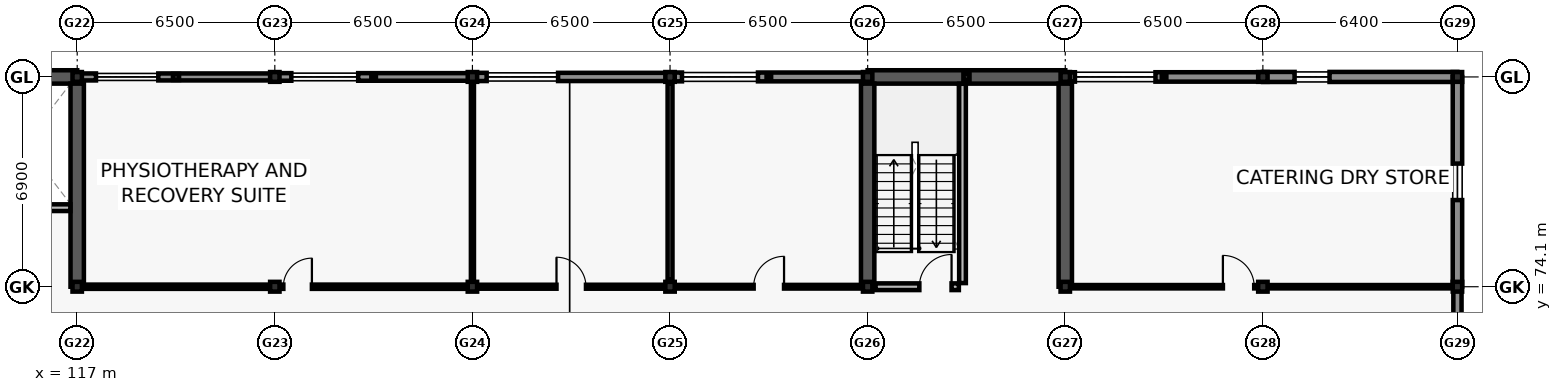
"""IFC4 building model, lengths in metres.
Left out: names, types, materials, properties, quantities, classifications, styles, units other than length and angle.
Written with IfcOpenShell. Run it as: python <this file> out.ifc"""

import sys

from ifc_helpers import new_model, si_unit, direction, frame, frame_2d, origin, origin_2d, place, context, subcontext, project, spatial, rectangle, hollow_rectangle, i_section, extrude, element, fill, save


model = new_model("IFC4")
c1 = context("Model", 3, precision=1e-05, world=origin(), true_north=direction((0.0, 1.0)))
c2 = subcontext(c1, "Body", "Model", "MODEL_VIEW")
j1 = project(units=[si_unit("LENGTHUNIT", "METRE"), si_unit("PLANEANGLEUNIT", "RADIAN")], contexts=[c1])
p1 = place(None, origin())
s1 = spatial("IfcSite", under=j1, at=p1, CompositionType="ELEMENT")
p2 = place(p1, origin())
s2 = spatial("IfcBuilding", under=s1, at=p2, CompositionType="ELEMENT")
p3 = place(p2, frame((0.0, 0.0, 5.4)))
s3 = spatial("IfcBuildingStorey", under=s2, at=p3, CompositionType="ELEMENT", Elevation=5.4)
for number, where, z_axis, x_axis in (
    (1, (117.0, 74.1, 0.0), (0.0, 0.0, 1.0), (1.0, 0.0, 0.0)),
    (2, (117.0, 81.0, 0.0), (0.0, 0.0, 1.0), (1.0, 0.0, 0.0)),
    (3, (123.5, 74.1, 0.0), (0.0, 0.0, 1.0), (1.0, 0.0, 0.0)),
    (4, (123.5, 81.0, 0.0), (0.0, 0.0, 1.0), (1.0, 0.0, 0.0)),
    (5, (130.0, 74.1, 0.0), (0.0, 0.0, 1.0), (1.0, 0.0, 0.0)),
    (6, (130.0, 81.0, 0.0), (0.0, 0.0, 1.0), (1.0, 0.0, 0.0)),
    (7, (136.5, 74.1, 0.0), (0.0, 0.0, 1.0), (1.0, 0.0, 0.0)),
    (8, (136.5, 81.0, 0.0), (0.0, 0.0, 1.0), (1.0, 0.0, 0.0)),
    (9, (143.0, 74.1, 0.0), (0.0, 0.0, 1.0), (1.0, 0.0, 0.0)),
    (10, (143.0, 81.0, 0.0), (0.0, 0.0, 1.0), (1.0, 0.0, 0.0)),
    (11, (149.5, 74.1, 0.0), (0.0, 0.0, 1.0), (1.0, 0.0, 0.0)),
    (12, (149.5, 81.0, 0.0), (0.0, 0.0, 1.0), (1.0, 0.0, 0.0)),
    (13, (156.0, 74.1, 0.0), (0.0, 0.0, 1.0), (1.0, 0.0, 0.0)),
    (14, (156.0, 81.0, 0.0), (0.0, 0.0, 1.0), (1.0, 0.0, 0.0)),
    (15, (162.4, 74.1, 0.0), (0.0, 0.0, 1.0), (1.0, 0.0, 0.0)),
    (16, (162.4, 81.0, 0.0), (0.0, 0.0, 1.0), (1.0, 0.0, 0.0)),
):
    element("IfcColumn", number, at=place(p3, frame(where, z_axis=z_axis, x_axis=x_axis)), inside=s3, PredefinedType="COLUMN", context=c2, shape_type="SweptSolid", body=[
        extrude(i_section(OverallWidth=0.309, OverallDepth=0.321, WebThickness=0.014, FlangeThickness=0.022, FilletRadius=0.017, at=origin_2d()), origin(), (0.0, 0.0, 1.0), 4.2),
    ])
p4 = place(p3, frame((120.25, 81.0, 0.0), z_axis=(0.0, 0.0, 1.0), x_axis=(1.0, 0.0, 0.0)))
e17 = element("IfcColumn", 17, at=p4, inside=s3, PredefinedType="PILASTER", context=c2, shape_type="SweptSolid", body=[
    extrude(hollow_rectangle(XDim=0.2, YDim=0.2, WallThickness=0.01, at=origin_2d()), origin(), (0.0, 0.0, 1.0), 4.2),
])
for number, where, z_axis, x_axis in (
    (18, (126.75, 81.0, 0.0), (0.0, 0.0, 1.0), (1.0, 0.0, 0.0)),
    (19, (139.75, 81.0, 0.0), (0.0, 0.0, 1.0), (1.0, 0.0, 0.0)),
):
    element("IfcColumn", number, at=place(p3, frame(where, z_axis=z_axis, x_axis=x_axis)), inside=s3, PredefinedType="PILASTER", context=c2, shape_type="SweptSolid", body=[
        extrude(hollow_rectangle(XDim=0.15, YDim=0.15, WallThickness=0.009, at=origin_2d()), origin(), (0.0, 0.0, 1.0), 4.2),
    ])
p5 = place(p3, frame((146.25, 81.0, 0.0), z_axis=(0.0, 0.0, 1.0), x_axis=(1.0, 0.0, 0.0)))
e20 = element("IfcColumn", 20, at=p5, inside=s3, PredefinedType="PILASTER", context=c2, shape_type="SweptSolid", body=[
    extrude(hollow_rectangle(XDim=0.2, YDim=0.2, WallThickness=0.01, at=origin_2d()), origin(), (0.0, 0.0, 1.0), 4.2),
])
p6 = place(p3, frame((152.75, 81.0, 0.0), z_axis=(0.0, 0.0, 1.0), x_axis=(1.0, 0.0, 0.0)))
e21 = element("IfcColumn", 21, at=p6, inside=s3, PredefinedType="PILASTER", context=c2, shape_type="SweptSolid", body=[
    extrude(hollow_rectangle(XDim=0.15, YDim=0.15, WallThickness=0.009, at=origin_2d()), origin(), (0.0, 0.0, 1.0), 4.2),
])
p7 = place(p3, frame((110.5, 81.0, 0.0), z_axis=(0.0, 0.0, 1.0), x_axis=(1.0, 0.0, 0.0)))
e22 = element("IfcWall", 22, at=p7, inside=s3, PredefinedType="SHEAR", context=c2, shape_type="SweptSolid", body=[
    extrude(rectangle(XDim=6.5, YDim=0.44, at=frame_2d((3.25, 0.0))), origin(), (0.0, 0.0, 1.0), 3.96),
])
p8 = place(p3, frame((117.0, 74.1, 0.0), z_axis=(0.0, 0.0, 1.0), x_axis=(0.0, 1.0, 0.0)))
e23 = element("IfcWall", 23, at=p8, inside=s3, PredefinedType="SHEAR", context=c2, shape_type="SweptSolid", body=[
    extrude(rectangle(XDim=6.68, YDim=0.44, at=frame_2d((3.34, 0.0))), origin(), (0.0, 0.0, 1.0), 3.96),
])
p9 = place(p3, frame((143.0, 81.0, 0.0), z_axis=(0.0, 0.0, 1.0), x_axis=(1.0, 0.0, 0.0)))
e24 = element("IfcWall", 24, at=p9, inside=s3, PredefinedType="SHEAR", context=c2, shape_type="SweptSolid", body=[
    extrude(rectangle(XDim=6.5, YDim=0.44, at=frame_2d((3.25, 0.0))), origin(), (0.0, 0.0, 1.0), 3.96),
])
for number, where, z_axis, x_axis in (
    (25, (143.0, 74.1, 0.0), (0.0, 0.0, 1.0), (0.0, 1.0, 0.0)),
    (26, (149.5, 74.1, 0.0), (0.0, 0.0, 1.0), (0.0, 1.0, 0.0)),
):
    element("IfcWall", number, at=place(p3, frame(where, z_axis=z_axis, x_axis=x_axis)), inside=s3, PredefinedType="SHEAR", context=c2, shape_type="SweptSolid", body=[
        extrude(rectangle(XDim=6.68, YDim=0.44, at=frame_2d((3.34, 0.0))), origin(), (0.0, 0.0, 1.0), 3.96),
    ])
p10 = place(p3, frame((117.005, 81.0, 0.0), z_axis=(0.0, 0.0, 1.0), x_axis=(1.0, 0.0, 0.0)))
e27 = element("IfcWall", 27, at=p10, inside=s3, PredefinedType="SOLIDWALL", context=c2, shape_type="SweptSolid", body=[
    extrude(rectangle(XDim=6.49, YDim=0.23, at=frame_2d((3.245, 0.0))), origin(), (0.0, 0.0, 1.0), 3.32),
])
p11 = place(p10, frame((0.613, 0.0, 0.8)))
e28 = element("IfcOpeningElement", 28, at=p11, cuts=e27, PredefinedType="OPENING", context=c2, shape_type="SweptSolid", body=[
    extrude(rectangle(XDim=2.05, YDim=1.8, at=frame_2d((1.025, 0.9))), frame((0.0, 0.125, 0.0), z_axis=(0.0, -1.0, 0.0), x_axis=(1.0, 0.0, 0.0)), (0.0, 0.0, 1.0), 0.25),
])
p12 = place(p3, frame((123.505, 81.0, 0.0), z_axis=(0.0, 0.0, 1.0), x_axis=(1.0, 0.0, 0.0)))
e29 = element("IfcWall", 29, at=p12, inside=s3, PredefinedType="SOLIDWALL", context=c2, shape_type="SweptSolid", body=[
    extrude(rectangle(XDim=6.49, YDim=0.25, at=frame_2d((3.245, 0.0))), origin(), (0.0, 0.0, 1.0), 3.32),
])
p13 = place(p12, frame((0.538, 0.0, 0.8)))
e30 = element("IfcOpeningElement", 30, at=p13, cuts=e29, PredefinedType="OPENING", context=c2, shape_type="SweptSolid", body=[
    extrude(rectangle(XDim=2.2, YDim=1.8, at=frame_2d((1.1, 0.9))), frame((0.0, 0.135, 0.0), z_axis=(0.0, -1.0, 0.0), x_axis=(1.0, 0.0, 0.0)), (0.0, 0.0, 1.0), 0.27),
])
p14 = place(p3, frame((130.005, 81.0, 0.0), z_axis=(0.0, 0.0, 1.0), x_axis=(1.0, 0.0, 0.0)))
e31 = element("IfcWall", 31, at=p14, inside=s3, PredefinedType="SOLIDWALL", context=c2, shape_type="SweptSolid", body=[
    extrude(rectangle(XDim=6.49, YDim=0.27, at=frame_2d((3.245, 0.0))), origin(), (0.0, 0.0, 1.0), 3.32),
])
p15 = place(p14, frame((0.462, 0.0, 0.8)))
e32 = element("IfcOpeningElement", 32, at=p15, cuts=e31, PredefinedType="OPENING", context=c2, shape_type="SweptSolid", body=[
    extrude(rectangle(XDim=2.35, YDim=1.8, at=frame_2d((1.175, 0.9))), frame((0.0, 0.145, 0.0), z_axis=(0.0, -1.0, 0.0), x_axis=(1.0, 0.0, 0.0)), (0.0, 0.0, 1.0), 0.29),
])
p16 = place(p3, frame((136.505, 81.0, 0.0), z_axis=(0.0, 0.0, 1.0), x_axis=(1.0, 0.0, 0.0)))
e33 = element("IfcWall", 33, at=p16, inside=s3, PredefinedType="SOLIDWALL", context=c2, shape_type="SweptSolid", body=[
    extrude(rectangle(XDim=6.49, YDim=0.29, at=frame_2d((3.245, 0.0))), origin(), (0.0, 0.0, 1.0), 3.32),
])
p17 = place(p16, frame((0.387, 0.0, 0.8)))
e34 = element("IfcOpeningElement", 34, at=p17, cuts=e33, PredefinedType="OPENING", context=c2, shape_type="SweptSolid", body=[
    extrude(rectangle(XDim=2.5, YDim=1.8, at=frame_2d((1.25, 0.9))), frame((0.0, 0.155, 0.0), z_axis=(0.0, -1.0, 0.0), x_axis=(1.0, 0.0, 0.0)), (0.0, 0.0, 1.0), 0.31),
])
p18 = place(p3, frame((149.505, 81.0, 0.0), z_axis=(0.0, 0.0, 1.0), x_axis=(1.0, 0.0, 0.0)))
e35 = element("IfcWall", 35, at=p18, inside=s3, PredefinedType="SOLIDWALL", context=c2, shape_type="SweptSolid", body=[
    extrude(rectangle(XDim=6.49, YDim=0.31, at=frame_2d((3.245, 0.0))), origin(), (0.0, 0.0, 1.0), 3.32),
])
p19 = place(p18, frame((0.312, 0.0, 0.8)))
e36 = element("IfcOpeningElement", 36, at=p19, cuts=e35, PredefinedType="OPENING", context=c2, shape_type="SweptSolid", body=[
    extrude(rectangle(XDim=2.65, YDim=1.8, at=frame_2d((1.325, 0.9))), frame((0.0, 0.165, 0.0), z_axis=(0.0, -1.0, 0.0), x_axis=(1.0, 0.0, 0.0)), (0.0, 0.0, 1.0), 0.33),
])
p20 = place(p3, frame((156.005, 81.0, 0.0), z_axis=(0.0, 0.0, 1.0), x_axis=(1.0, 0.0, 0.0)))
e37 = element("IfcWall", 37, at=p20, inside=s3, PredefinedType="SOLIDWALL", context=c2, shape_type="SweptSolid", body=[
    extrude(rectangle(XDim=6.39, YDim=0.33, at=frame_2d((3.195, 0.0))), origin(), (0.0, 0.0, 1.0), 3.32),
])
p21 = place(p20, frame((1.038, 0.0, 0.8)))
e38 = element("IfcOpeningElement", 38, at=p21, cuts=e37, PredefinedType="OPENING", context=c2, shape_type="SweptSolid", body=[
    extrude(rectangle(XDim=1.15, YDim=1.8, at=frame_2d((0.575, 0.9))), frame((0.0, 0.175, 0.0), z_axis=(0.0, -1.0, 0.0), x_axis=(1.0, 0.0, 0.0)), (0.0, 0.0, 1.0), 0.35),
])
p22 = place(p3, frame((162.4, 74.095, 0.0), z_axis=(0.0, 0.0, 1.0), x_axis=(0.0, -1.0, 0.0)))
e39 = element("IfcWall", 39, at=p22, inside=s3, PredefinedType="SOLIDWALL", context=c2, shape_type="SweptSolid", body=[
    extrude(rectangle(XDim=6.89, YDim=0.27, at=frame_2d((3.445, 0.0))), origin(), (0.0, 0.0, 1.0), 3.32),
])
p23 = place(p22, frame((4.002, 0.0, 0.8)))
e40 = element("IfcOpeningElement", 40, at=p23, cuts=e39, PredefinedType="OPENING", context=c2, shape_type="SweptSolid", body=[
    extrude(rectangle(XDim=1.45, YDim=1.8, at=frame_2d((0.725, 0.9))), frame((0.0, 0.145, 0.0), z_axis=(0.0, -1.0, 0.0), x_axis=(1.0, 0.0, 0.0)), (0.0, 0.0, 1.0), 0.29),
])
p24 = place(p3, frame((162.4, 80.995, 0.0), z_axis=(0.0, 0.0, 1.0), x_axis=(0.0, -1.0, 0.0)))
e41 = element("IfcWall", 41, at=p24, inside=s3, PredefinedType="SOLIDWALL", context=c2, shape_type="SweptSolid", body=[
    extrude(rectangle(XDim=6.89, YDim=0.31, at=frame_2d((3.445, 0.0))), origin(), (0.0, 0.0, 1.0), 3.32),
])
p25 = place(p24, frame((2.845, 0.0, 0.8)))
e42 = element("IfcOpeningElement", 42, at=p25, cuts=e41, PredefinedType="OPENING", context=c2, shape_type="SweptSolid", body=[
    extrude(rectangle(XDim=1.2, YDim=2.05, at=frame_2d((0.6, 1.025))), frame((0.0, 0.165, 0.0), z_axis=(0.0, -1.0, 0.0), x_axis=(1.0, 0.0, 0.0)), (0.0, 0.0, 1.0), 0.33),
])
p26 = place(p3, frame((113.74, 76.7, 0.0), z_axis=(0.0, 0.0, 1.0), x_axis=(1.0, 0.0, 0.0)))
e43 = element("IfcWall", 43, at=p26, inside=s3, PredefinedType="SOLIDWALL", context=c2, shape_type="SweptSolid", body=[
    extrude(rectangle(XDim=3.035, YDim=0.22, at=frame_2d((1.518, 0.0))), origin(), (0.0, 0.0, 1.0), 3.96),
])
p27 = place(p26, frame((0.917, 0.0, 0.0)))
e44 = element("IfcOpeningElement", 44, at=p27, cuts=e43, PredefinedType="OPENING", context=c2, shape_type="SweptSolid", body=[
    extrude(rectangle(XDim=1.2, YDim=2.15, at=frame_2d((0.6, 1.075))), frame((0.0, 0.12, 0.0), z_axis=(0.0, -1.0, 0.0), x_axis=(1.0, 0.0, 0.0)), (0.0, 0.0, 1.0), 0.24),
])
p28 = place(p3, frame((146.12, 74.22, 0.0), z_axis=(0.0, 0.0, 1.0), x_axis=(0.0, 1.0, 0.0)))
e45 = element("IfcWall", 45, at=p28, inside=s3, PredefinedType="SOLIDWALL", context=c2, shape_type="SweptSolid", body=[
    extrude(rectangle(XDim=6.555, YDim=0.22, at=frame_2d((3.277, 0.0))), origin(), (0.0, 0.0, 1.0), 3.96),
])
p29 = place(p3, frame((143.26, 74.1, 0.0), z_axis=(0.0, 0.0, 1.0), x_axis=(1.0, 0.0, 0.0)))
e46 = element("IfcWall", 46, at=p29, inside=s3, PredefinedType="SOLIDWALL", context=c2, shape_type="SweptSolid", body=[
    extrude(rectangle(XDim=2.74, YDim=0.22, at=frame_2d((1.37, 0.0))), origin(), (0.0, 0.0, 1.0), 3.32),
])
p30 = place(p29, frame((1.44, 0.0, 0.0)))
e47 = element("IfcOpeningElement", 47, at=p30, cuts=e46, PredefinedType="OPENING", context=c2, shape_type="SweptSolid", body=[
    extrude(rectangle(XDim=1.06, YDim=2.1, at=frame_2d((0.53, 1.05))), frame((0.0, 0.12, 0.0), z_axis=(0.0, -1.0, 0.0), x_axis=(1.0, 0.0, 0.0)), (0.0, 0.0, 1.0), 0.24),
])
p31 = place(p3, frame((117.22, 74.1, 0.0), z_axis=(0.0, 0.0, 1.0), x_axis=(1.0, 0.0, 0.0)))
e48 = element("IfcWall", 48, at=p31, inside=s3, PredefinedType="PARTITIONING", context=c2, shape_type="SweptSolid", body=[
    extrude(rectangle(XDim=12.56, YDim=0.14, at=frame_2d((6.28, 0.0))), origin(), (0.0, 0.0, 1.0), 3.3),
])
p32 = place(p31, frame((6.56, 0.0, 0.0)))
e49 = element("IfcOpeningElement", 49, at=p32, cuts=e48, PredefinedType="OPENING", context=c2, shape_type="SweptSolid", body=[
    extrude(rectangle(XDim=0.94, YDim=2.08, at=frame_2d((0.47, 1.04))), frame((0.0, 0.08, 0.0), z_axis=(0.0, -1.0, 0.0), x_axis=(1.0, 0.0, 0.0)), (0.0, 0.0, 1.0), 0.16),
])
p33 = place(p3, frame((130.22, 74.1, 0.0), z_axis=(0.0, 0.0, 1.0), x_axis=(1.0, 0.0, 0.0)))
e50 = element("IfcWall", 50, at=p33, inside=s3, PredefinedType="PARTITIONING", context=c2, shape_type="SweptSolid", body=[
    extrude(rectangle(XDim=6.06, YDim=0.13, at=frame_2d((3.03, 0.0))), origin(), (0.0, 0.0, 1.0), 3.3),
])
p34 = place(p33, frame((2.545, 0.0, 0.0)))
e51 = element("IfcOpeningElement", 51, at=p34, cuts=e50, PredefinedType="OPENING", context=c2, shape_type="SweptSolid", body=[
    extrude(rectangle(XDim=0.97, YDim=2.1, at=frame_2d((0.485, 1.05))), frame((0.0, 0.075, 0.0), z_axis=(0.0, -1.0, 0.0), x_axis=(1.0, 0.0, 0.0)), (0.0, 0.0, 1.0), 0.15),
])
p35 = place(p3, frame((136.72, 74.1, 0.0), z_axis=(0.0, 0.0, 1.0), x_axis=(1.0, 0.0, 0.0)))
e52 = element("IfcWall", 52, at=p35, inside=s3, PredefinedType="PARTITIONING", context=c2, shape_type="SweptSolid", body=[
    extrude(rectangle(XDim=6.06, YDim=0.12, at=frame_2d((3.03, 0.0))), origin(), (0.0, 0.0, 1.0), 3.3),
])
p36 = place(p35, frame((2.53, 0.0, 0.0)))
e53 = element("IfcOpeningElement", 53, at=p36, cuts=e52, PredefinedType="OPENING", context=c2, shape_type="SweptSolid", body=[
    extrude(rectangle(XDim=1.0, YDim=2.12, at=frame_2d((0.5, 1.06))), frame((0.0, 0.07, 0.0), z_axis=(0.0, -1.0, 0.0), x_axis=(1.0, 0.0, 0.0)), (0.0, 0.0, 1.0), 0.14),
])
p37 = place(p3, frame((149.72, 74.1, 0.0), z_axis=(0.0, 0.0, 1.0), x_axis=(1.0, 0.0, 0.0)))
e54 = element("IfcWall", 54, at=p37, inside=s3, PredefinedType="PARTITIONING", context=c2, shape_type="SweptSolid", body=[
    extrude(rectangle(XDim=12.46, YDim=0.11, at=frame_2d((6.23, 0.0))), origin(), (0.0, 0.0, 1.0), 3.3),
])
p38 = place(p37, frame((4.965, 0.0, 0.0)))
e55 = element("IfcOpeningElement", 55, at=p38, cuts=e54, PredefinedType="OPENING", context=c2, shape_type="SweptSolid", body=[
    extrude(rectangle(XDim=1.03, YDim=2.06, at=frame_2d((0.515, 1.03))), frame((0.0, 0.065, 0.0), z_axis=(0.0, -1.0, 0.0), x_axis=(1.0, 0.0, 0.0)), (0.0, 0.0, 1.0), 0.13),
])
p39 = place(p3, frame((130.0, 74.32, 0.0), z_axis=(0.0, 0.0, 1.0), x_axis=(0.0, 1.0, 0.0)))
e56 = element("IfcWall", 56, at=p39, inside=s3, PredefinedType="PARTITIONING", context=c2, shape_type="SweptSolid", body=[
    extrude(rectangle(XDim=6.46, YDim=0.1, at=frame_2d((3.23, 0.0))), origin(), (0.0, 0.0, 1.0), 3.3),
])
p40 = place(p3, frame((136.5, 74.32, 0.0), z_axis=(0.0, 0.0, 1.0), x_axis=(0.0, 1.0, 0.0)))
e57 = element("IfcWall", 57, at=p40, inside=s3, PredefinedType="PARTITIONING", context=c2, shape_type="SweptSolid", body=[
    extrude(rectangle(XDim=6.46, YDim=0.16, at=frame_2d((3.23, 0.0))), origin(), (0.0, 0.0, 1.0), 3.3),
])
p41 = place(p11, origin())
e58 = element("IfcWindow", 58, at=p41, inside=s3, PartitioningType="DOUBLE_PANEL_VERTICAL", PredefinedType="WINDOW", context=c2, shape_type="SweptSolid", body=[
    extrude(rectangle(XDim=2.05, YDim=1.8, at=frame_2d((1.025, 0.9))), frame((0.0, 0.03, 0.0), z_axis=(0.0, -1.0, 0.0), x_axis=(1.0, 0.0, 0.0)), (0.0, 0.0, 1.0), 0.06),
])
fill(e28, e58)
p42 = place(p13, origin())
e59 = element("IfcWindow", 59, at=p42, inside=s3, PartitioningType="DOUBLE_PANEL_VERTICAL", PredefinedType="WINDOW", context=c2, shape_type="SweptSolid", body=[
    extrude(rectangle(XDim=2.2, YDim=1.8, at=frame_2d((1.1, 0.9))), frame((0.0, 0.03, 0.0), z_axis=(0.0, -1.0, 0.0), x_axis=(1.0, 0.0, 0.0)), (0.0, 0.0, 1.0), 0.06),
])
fill(e30, e59)
p43 = place(p15, origin())
e60 = element("IfcWindow", 60, at=p43, inside=s3, PartitioningType="DOUBLE_PANEL_VERTICAL", PredefinedType="WINDOW", context=c2, shape_type="SweptSolid", body=[
    extrude(rectangle(XDim=2.35, YDim=1.8, at=frame_2d((1.175, 0.9))), frame((0.0, 0.03, 0.0), z_axis=(0.0, -1.0, 0.0), x_axis=(1.0, 0.0, 0.0)), (0.0, 0.0, 1.0), 0.06),
])
fill(e32, e60)
p44 = place(p17, origin())
e61 = element("IfcWindow", 61, at=p44, inside=s3, PartitioningType="TRIPLE_PANEL_VERTICAL", PredefinedType="WINDOW", context=c2, shape_type="SweptSolid", body=[
    extrude(rectangle(XDim=2.5, YDim=1.8, at=frame_2d((1.25, 0.9))), frame((0.0, 0.03, 0.0), z_axis=(0.0, -1.0, 0.0), x_axis=(1.0, 0.0, 0.0)), (0.0, 0.0, 1.0), 0.06),
])
fill(e34, e61)
p45 = place(p19, origin())
e62 = element("IfcWindow", 62, at=p45, inside=s3, PartitioningType="TRIPLE_PANEL_VERTICAL", PredefinedType="WINDOW", context=c2, shape_type="SweptSolid", body=[
    extrude(rectangle(XDim=2.65, YDim=1.8, at=frame_2d((1.325, 0.9))), frame((0.0, 0.03, 0.0), z_axis=(0.0, -1.0, 0.0), x_axis=(1.0, 0.0, 0.0)), (0.0, 0.0, 1.0), 0.06),
])
fill(e36, e62)
p46 = place(p21, origin())
e63 = element("IfcWindow", 63, at=p46, inside=s3, PartitioningType="SINGLE_PANEL", PredefinedType="WINDOW", context=c2, shape_type="SweptSolid", body=[
    extrude(rectangle(XDim=1.15, YDim=1.8, at=frame_2d((0.575, 0.9))), frame((0.0, 0.03, 0.0), z_axis=(0.0, -1.0, 0.0), x_axis=(1.0, 0.0, 0.0)), (0.0, 0.0, 1.0), 0.06),
])
fill(e38, e63)
p47 = place(p25, origin())
e64 = element("IfcWindow", 64, at=p47, inside=s3, PartitioningType="SINGLE_PANEL", PredefinedType="WINDOW", context=c2, shape_type="SweptSolid", body=[
    extrude(rectangle(XDim=1.2, YDim=2.05, at=frame_2d((0.6, 1.025))), frame((0.0, 0.03, 0.0), z_axis=(0.0, -1.0, 0.0), x_axis=(1.0, 0.0, 0.0)), (0.0, 0.0, 1.0), 0.06),
])
fill(e42, e64)
p48 = place(p30, origin())
e65 = element("IfcDoor", 65, at=p48, inside=s3, OperationType="SINGLE_SWING_RIGHT", PredefinedType="DOOR", context=c2, shape_type="SweptSolid", body=[
    extrude(rectangle(XDim=1.06, YDim=2.1, at=frame_2d((0.53, 1.05))), frame((0.0, 0.025, 0.0), z_axis=(0.0, -1.0, 0.0), x_axis=(1.0, 0.0, 0.0)), (0.0, 0.0, 1.0), 0.05),
])
fill(e47, e65)
p49 = place(p32, origin())
e66 = element("IfcDoor", 66, at=p49, inside=s3, OperationType="SINGLE_SWING_RIGHT", PredefinedType="DOOR", context=c2, shape_type="SweptSolid", body=[
    extrude(rectangle(XDim=0.94, YDim=2.08, at=frame_2d((0.47, 1.04))), frame((0.0, 0.025, 0.0), z_axis=(0.0, -1.0, 0.0), x_axis=(1.0, 0.0, 0.0)), (0.0, 0.0, 1.0), 0.05),
])
fill(e49, e66)
p50 = place(p34, origin())
e67 = element("IfcDoor", 67, at=p50, inside=s3, OperationType="SINGLE_SWING_LEFT", PredefinedType="DOOR", context=c2, shape_type="SweptSolid", body=[
    extrude(rectangle(XDim=0.97, YDim=2.1, at=frame_2d((0.485, 1.05))), frame((0.0, 0.025, 0.0), z_axis=(0.0, -1.0, 0.0), x_axis=(1.0, 0.0, 0.0)), (0.0, 0.0, 1.0), 0.05),
])
fill(e51, e67)
p51 = place(p36, origin())
e68 = element("IfcDoor", 68, at=p51, inside=s3, OperationType="SINGLE_SWING_RIGHT", PredefinedType="DOOR", context=c2, shape_type="SweptSolid", body=[
    extrude(rectangle(XDim=1.0, YDim=2.12, at=frame_2d((0.5, 1.06))), frame((0.0, 0.025, 0.0), z_axis=(0.0, -1.0, 0.0), x_axis=(1.0, 0.0, 0.0)), (0.0, 0.0, 1.0), 0.05),
])
fill(e53, e68)
p52 = place(p38, origin())
e69 = element("IfcDoor", 69, at=p52, inside=s3, OperationType="SINGLE_SWING_LEFT", PredefinedType="DOOR", context=c2, shape_type="SweptSolid", body=[
    extrude(rectangle(XDim=1.03, YDim=2.06, at=frame_2d((0.515, 1.03))), frame((0.0, 0.025, 0.0), z_axis=(0.0, -1.0, 0.0), x_axis=(1.0, 0.0, 0.0)), (0.0, 0.0, 1.0), 0.05),
])
fill(e55, e69)
save(model, sys.argv[1])
